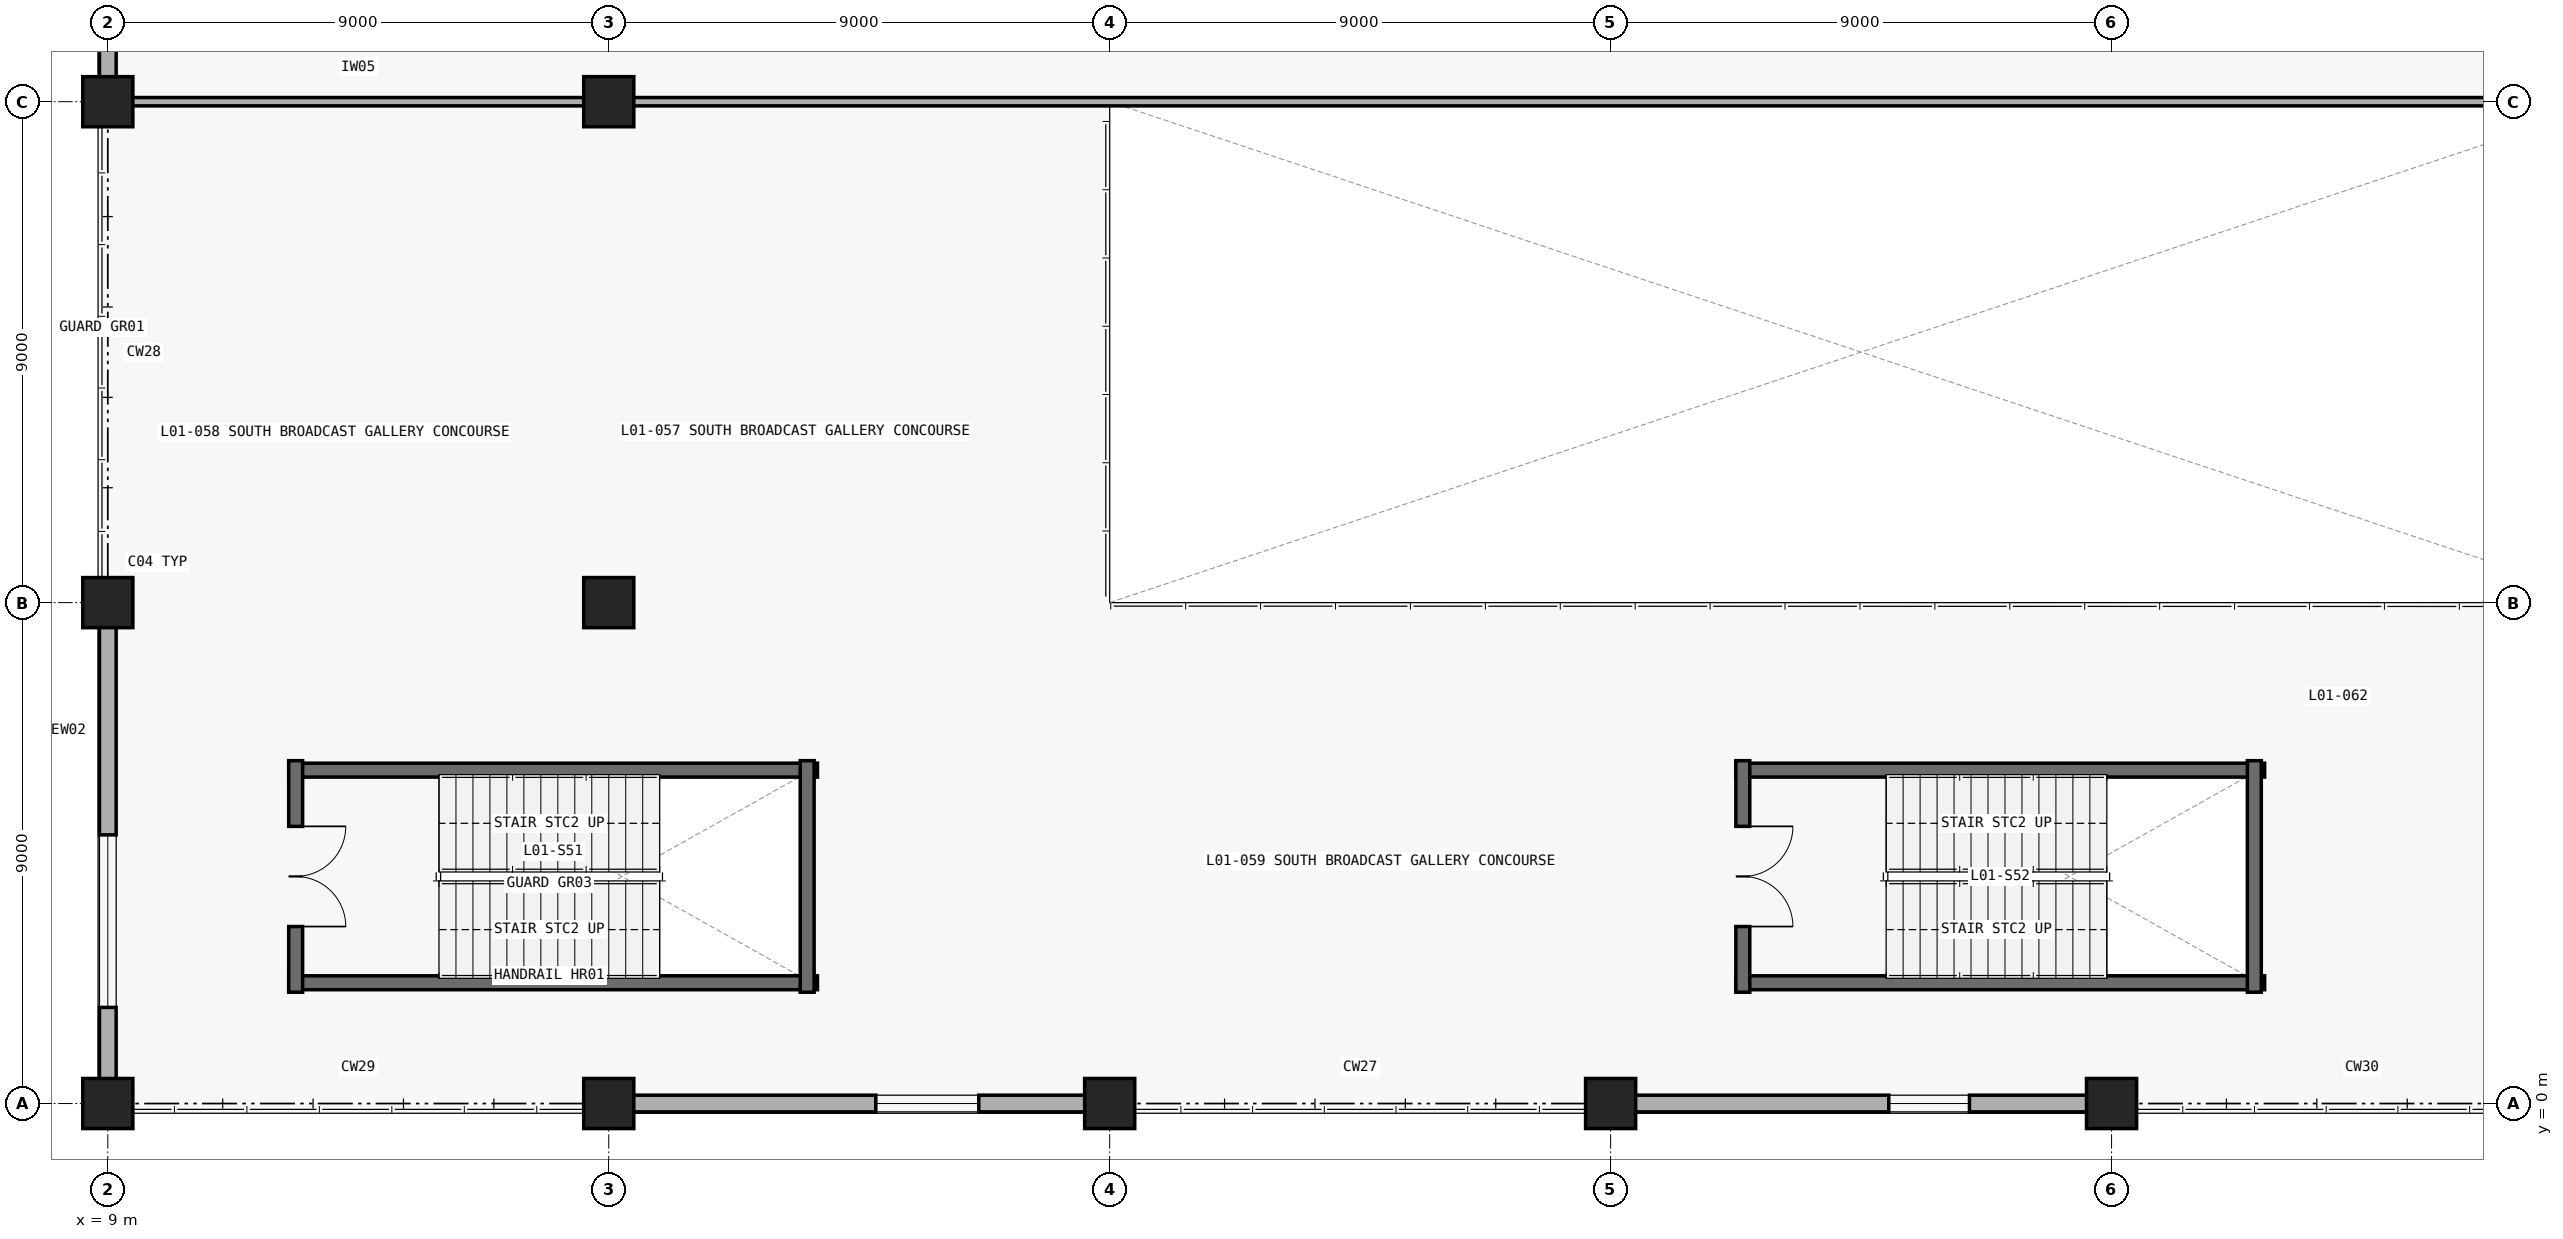
"""IFC4 building model, lengths in metres.
Left out: names, types, materials, properties, quantities, classifications, styles, units other than length and angle.
Written with IfcOpenShell. Run it as: python <this file> out.ifc"""

import sys

from ifc_helpers import new_model, si_unit, direction, frame, frame_2d, origin, origin_2d, place, context, subcontext, project, spatial, rectangle, extrude, element, fill, save


model = new_model("IFC4")
c1 = context("Model", 3, precision=1e-05, world=origin(), true_north=direction((0.0, 1.0)))
c2 = subcontext(c1, "Body", "Model", "MODEL_VIEW")
j1 = project(units=[si_unit("LENGTHUNIT", "METRE"), si_unit("PLANEANGLEUNIT", "RADIAN")], contexts=[c1])
p1 = place(None, origin())
s1 = spatial("IfcSite", under=j1, at=p1, CompositionType="ELEMENT")
p2 = place(p1, origin())
s2 = spatial("IfcBuilding", under=s1, at=p2, CompositionType="ELEMENT")
p3 = place(p2, frame((0.0, 0.0, 5.4)))
s3 = spatial("IfcBuildingStorey", under=s2, at=p3, CompositionType="ELEMENT", Elevation=5.4)
for number, where, z_axis, x_axis in (
    (1, (9.0, 0.0, 0.0), (0.0, 0.0, 1.0), (1.0, 0.0, 0.0)),
    (2, (9.0, 9.0, 0.0), (0.0, 0.0, 1.0), (1.0, 0.0, 0.0)),
    (3, (9.0, 18.0, 0.0), (0.0, 0.0, 1.0), (1.0, 0.0, 0.0)),
    (4, (18.0, 0.0, 0.0), (0.0, 0.0, 1.0), (1.0, 0.0, 0.0)),
    (5, (18.0, 9.0, 0.0), (0.0, 0.0, 1.0), (1.0, 0.0, 0.0)),
    (6, (18.0, 18.0, 0.0), (0.0, 0.0, 1.0), (1.0, 0.0, 0.0)),
    (7, (27.0, 0.0, 0.0), (0.0, 0.0, 1.0), (1.0, 0.0, 0.0)),
    (8, (36.0, 0.0, 0.0), (0.0, 0.0, 1.0), (1.0, 0.0, 0.0)),
    (9, (45.0, 0.0, 0.0), (0.0, 0.0, 1.0), (1.0, 0.0, 0.0)),
):
    element("IfcColumn", number, at=place(p3, frame(where, z_axis=z_axis, x_axis=x_axis)), inside=s3, PredefinedType="COLUMN", context=c2, shape_type="SweptSolid", body=[
        extrude(rectangle(XDim=0.9, YDim=0.9, at=origin_2d()), origin(), (0.0, 0.0, 1.0), 4.8),
    ])
p4 = place(p3, frame((44.575, 0.0, 0.0), z_axis=(0.0, 0.0, 1.0), x_axis=(-1.0, 0.0, 0.0)))
e10 = element("IfcWall", 10, at=p4, inside=s3, PredefinedType="STANDARD", context=c2, shape_type="SweptSolid", body=[
    extrude(rectangle(XDim=8.15, YDim=0.3, at=frame_2d((4.075, 0.0))), origin(), (0.0, 0.0, 1.0), 3.804),
])
p5 = place(p4, frame((2.128, 0.0, 0.95)))
e11 = element("IfcOpeningElement", 11, at=p5, cuts=e10, PredefinedType="OPENING", context=c2, shape_type="SweptSolid", body=[
    extrude(rectangle(XDim=1.45, YDim=1.85, at=frame_2d((0.725, 0.925))), frame((0.0, 0.16, 0.0), z_axis=(0.0, -1.0, 0.0), x_axis=(1.0, 0.0, 0.0)), (0.0, 0.0, 1.0), 0.32),
])
p6 = place(p3, frame((26.575, 0.0, 0.0), z_axis=(0.0, 0.0, 1.0), x_axis=(-1.0, 0.0, 0.0)))
e12 = element("IfcWall", 12, at=p6, inside=s3, PredefinedType="STANDARD", context=c2, shape_type="SweptSolid", body=[
    extrude(rectangle(XDim=8.15, YDim=0.3, at=frame_2d((4.075, 0.0))), origin(), (0.0, 0.0, 1.0), 3.804),
])
p7 = place(p6, frame((1.927, 0.0, 0.95)))
e13 = element("IfcOpeningElement", 13, at=p7, cuts=e12, PredefinedType="OPENING", context=c2, shape_type="SweptSolid", body=[
    extrude(rectangle(XDim=1.85, YDim=2.15, at=frame_2d((0.925, 1.075))), frame((0.0, 0.16, 0.0), z_axis=(0.0, -1.0, 0.0), x_axis=(1.0, 0.0, 0.0)), (0.0, 0.0, 1.0), 0.32),
])
p8 = place(p3, frame((9.0, 0.425, 0.0), z_axis=(0.0, 0.0, 1.0), x_axis=(0.0, 1.0, 0.0)))
e14 = element("IfcWall", 14, at=p8, inside=s3, PredefinedType="STANDARD", context=c2, shape_type="SweptSolid", body=[
    extrude(rectangle(XDim=8.15, YDim=0.3, at=frame_2d((4.075, 0.0))), origin(), (0.0, 0.0, 1.0), 3.837),
])
p9 = place(p8, frame((1.302, 0.0, 0.95)))
e15 = element("IfcOpeningElement", 15, at=p9, cuts=e14, PredefinedType="OPENING", context=c2, shape_type="SweptSolid", body=[
    extrude(rectangle(XDim=3.1, YDim=2.35, at=frame_2d((1.55, 1.175))), frame((0.0, 0.16, 0.0), z_axis=(0.0, -1.0, 0.0), x_axis=(1.0, 0.0, 0.0)), (0.0, 0.0, 1.0), 0.32),
])
p10 = place(p3, frame((9.0, 18.425, 0.0), z_axis=(0.0, 0.0, 1.0), x_axis=(0.0, 1.0, 0.0)))
e16 = element("IfcWall", 16, at=p10, inside=s3, PredefinedType="STANDARD", context=c2, shape_type="SweptSolid", body=[
    extrude(rectangle(XDim=8.15, YDim=0.3, at=frame_2d((4.075, 0.0))), origin(), (0.0, 0.0, 1.0), 3.837),
])
p11 = place(p10, frame((2.112, 0.0, 0.95)))
e17 = element("IfcOpeningElement", 17, at=p11, cuts=e16, PredefinedType="OPENING", context=c2, shape_type="SweptSolid", body=[
    extrude(rectangle(XDim=1.48, YDim=2.05, at=frame_2d((0.74, 1.025))), frame((0.0, 0.16, 0.0), z_axis=(0.0, -1.0, 0.0), x_axis=(1.0, 0.0, 0.0)), (0.0, 0.0, 1.0), 0.32),
])
for number, where, z_axis, x_axis in (
    (18, (12.25, 2.17, 0.0), (0.0, 0.0, 1.0), (1.0, 0.0, 0.0)),
    (19, (21.75, 5.99, 0.0), (0.0, 0.0, 1.0), (-1.0, 0.0, 0.0)),
):
    element("IfcWall", number, at=place(p3, frame(where, z_axis=z_axis, x_axis=x_axis)), inside=s3, PredefinedType="SHEAR", context=c2, shape_type="SweptSolid", body=[
        extrude(rectangle(XDim=9.5, YDim=0.25, at=frame_2d((4.75, 0.0))), origin(), (0.0, 0.0, 1.0), 4.52),
    ])
p12 = place(p3, frame((12.375, 6.16, 0.0), z_axis=(0.0, 0.0, 1.0), x_axis=(0.0, -1.0, 0.0)))
e20 = element("IfcWall", 20, at=p12, inside=s3, PredefinedType="SHEAR", context=c2, shape_type="SweptSolid", body=[
    extrude(rectangle(XDim=4.16, YDim=0.25, at=frame_2d((2.08, 0.0))), origin(), (0.0, 0.0, 1.0), 4.52),
])
p13 = place(p12, frame((1.18, 0.0, 0.0)))
e21 = element("IfcOpeningElement", 21, at=p13, cuts=e20, PredefinedType="OPENING", context=c2, shape_type="SweptSolid", body=[
    extrude(rectangle(XDim=1.8, YDim=2.25, at=frame_2d((0.9, 1.125))), frame((0.0, 0.135, 0.0), z_axis=(0.0, -1.0, 0.0), x_axis=(1.0, 0.0, 0.0)), (0.0, 0.0, 1.0), 0.27),
])
p14 = place(p3, frame((21.565, 2.0, 0.0), z_axis=(0.0, 0.0, 1.0), x_axis=(0.0, 1.0, 0.0)))
e22 = element("IfcWall", 22, at=p14, inside=s3, PredefinedType="SHEAR", context=c2, shape_type="SweptSolid", body=[
    extrude(rectangle(XDim=4.16, YDim=0.25, at=frame_2d((2.08, 0.0))), origin(), (0.0, 0.0, 1.0), 4.52),
])
for number, where, z_axis, x_axis in (
    (23, (38.25, 2.17, 0.0), (0.0, 0.0, 1.0), (1.0, 0.0, 0.0)),
    (24, (47.75, 5.99, 0.0), (0.0, 0.0, 1.0), (-1.0, 0.0, 0.0)),
):
    element("IfcWall", number, at=place(p3, frame(where, z_axis=z_axis, x_axis=x_axis)), inside=s3, PredefinedType="SHEAR", context=c2, shape_type="SweptSolid", body=[
        extrude(rectangle(XDim=9.5, YDim=0.25, at=frame_2d((4.75, 0.0))), origin(), (0.0, 0.0, 1.0), 4.52),
    ])
p15 = place(p3, frame((38.375, 6.16, 0.0), z_axis=(0.0, 0.0, 1.0), x_axis=(0.0, -1.0, 0.0)))
e25 = element("IfcWall", 25, at=p15, inside=s3, PredefinedType="SHEAR", context=c2, shape_type="SweptSolid", body=[
    extrude(rectangle(XDim=4.16, YDim=0.25, at=frame_2d((2.08, 0.0))), origin(), (0.0, 0.0, 1.0), 4.52),
])
p16 = place(p15, frame((1.18, 0.0, 0.0)))
e26 = element("IfcOpeningElement", 26, at=p16, cuts=e25, PredefinedType="OPENING", context=c2, shape_type="SweptSolid", body=[
    extrude(rectangle(XDim=1.8, YDim=2.25, at=frame_2d((0.9, 1.125))), frame((0.0, 0.135, 0.0), z_axis=(0.0, -1.0, 0.0), x_axis=(1.0, 0.0, 0.0)), (0.0, 0.0, 1.0), 0.27),
])
p17 = place(p3, frame((47.565, 2.0, 0.0), z_axis=(0.0, 0.0, 1.0), x_axis=(0.0, 1.0, 0.0)))
e27 = element("IfcWall", 27, at=p17, inside=s3, PredefinedType="SHEAR", context=c2, shape_type="SweptSolid", body=[
    extrude(rectangle(XDim=4.16, YDim=0.25, at=frame_2d((2.08, 0.0))), origin(), (0.0, 0.0, 1.0), 4.52),
])
p18 = place(p3, frame((9.435, 18.0, 0.0), z_axis=(0.0, 0.0, 1.0), x_axis=(1.0, 0.0, 0.0)))
e28 = element("IfcWall", 28, at=p18, inside=s3, PredefinedType="PARTITIONING", context=c2, shape_type="SweptSolid", body=[
    extrude(rectangle(XDim=8.13, YDim=0.15, at=frame_2d((4.065, 0.0))), origin(), (0.0, 0.0, 1.0), 3.804),
])
p19 = place(p3, frame((17.55, 18.0, 0.0), z_axis=(0.0, 0.0, 1.0), x_axis=(1.0, 0.0, 0.0)))
e29 = element("IfcWall", 29, at=p19, inside=s3, PredefinedType="PARTITIONING", context=c2, shape_type="SweptSolid", body=[
    extrude(rectangle(XDim=36.65, YDim=0.15, at=frame_2d((18.325, 0.0))), origin(), (0.0, 0.0, 1.0), 3.804),
])
p20 = place(p5, origin())
e30 = element("IfcWindow", 30, at=p20, inside=s3, PartitioningType="SINGLE_PANEL", PredefinedType="WINDOW", context=c2, shape_type="SweptSolid", body=[
    extrude(rectangle(XDim=1.45, YDim=1.85, at=frame_2d((0.725, 0.925))), frame((0.0, 0.03, 0.0), z_axis=(0.0, -1.0, 0.0), x_axis=(1.0, 0.0, 0.0)), (0.0, 0.0, 1.0), 0.06),
])
fill(e11, e30)
p21 = place(p7, origin())
e31 = element("IfcWindow", 31, at=p21, inside=s3, PartitioningType="SINGLE_PANEL", PredefinedType="WINDOW", context=c2, shape_type="SweptSolid", body=[
    extrude(rectangle(XDim=1.85, YDim=2.15, at=frame_2d((0.925, 1.075))), frame((0.0, 0.03, 0.0), z_axis=(0.0, -1.0, 0.0), x_axis=(1.0, 0.0, 0.0)), (0.0, 0.0, 1.0), 0.06),
])
fill(e13, e31)
p22 = place(p9, origin())
e32 = element("IfcWindow", 32, at=p22, inside=s3, PartitioningType="SINGLE_PANEL", PredefinedType="WINDOW", context=c2, shape_type="SweptSolid", body=[
    extrude(rectangle(XDim=3.1, YDim=2.35, at=frame_2d((1.55, 1.175))), frame((0.0, 0.03, 0.0), z_axis=(0.0, -1.0, 0.0), x_axis=(1.0, 0.0, 0.0)), (0.0, 0.0, 1.0), 0.06),
])
fill(e15, e32)
p23 = place(p13, origin())
e33 = element("IfcDoor", 33, at=p23, inside=s3, OperationType="DOUBLE_DOOR_SINGLE_SWING", PredefinedType="DOOR", context=c2, shape_type="SweptSolid", body=[
    extrude(rectangle(XDim=1.8, YDim=2.25, at=frame_2d((0.9, 1.125))), frame((0.0, 0.025, 0.0), z_axis=(0.0, -1.0, 0.0), x_axis=(1.0, 0.0, 0.0)), (0.0, 0.0, 1.0), 0.05),
])
fill(e21, e33)
p24 = place(p16, origin())
e34 = element("IfcDoor", 34, at=p24, inside=s3, OperationType="DOUBLE_DOOR_SINGLE_SWING", PredefinedType="DOOR", context=c2, shape_type="SweptSolid", body=[
    extrude(rectangle(XDim=1.8, YDim=2.25, at=frame_2d((0.9, 1.125))), frame((0.0, 0.025, 0.0), z_axis=(0.0, -1.0, 0.0), x_axis=(1.0, 0.0, 0.0)), (0.0, 0.0, 1.0), 0.05),
])
fill(e26, e34)
save(model, sys.argv[1])
